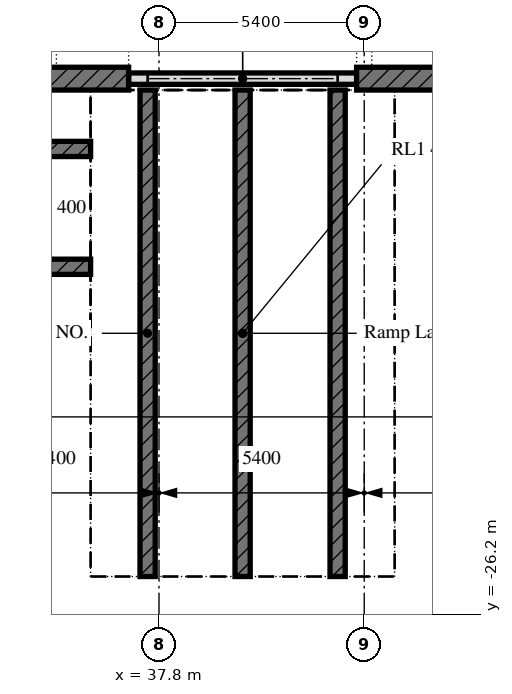
"""IFC4 building model, lengths in metres.
Left out: names, types, materials, properties, quantities, classifications, styles, units other than length and angle.
Written with IfcOpenShell. Run it as: python <this file> out.ifc"""

import sys

from ifc_helpers import new_model, si_unit, direction, frame, frame_2d, origin, place, context, subcontext, project, spatial, polyline, rectangle, outline, extrude, element, fill, save


model = new_model("IFC4")
c1 = context("Model", 3, precision=1e-05, world=origin(), true_north=direction((0.0, 1.0)))
c2 = subcontext(c1, "Body", "Model", "MODEL_VIEW")
j1 = project(units=[si_unit("LENGTHUNIT", "METRE"), si_unit("PLANEANGLEUNIT", "RADIAN")], contexts=[c1])
p1 = place(None, origin())
s1 = spatial("IfcSite", under=j1, at=p1, CompositionType="ELEMENT")
p2 = place(p1, origin())
s2 = spatial("IfcBuilding", under=s1, at=p2, CompositionType="ELEMENT")
p3 = place(p2, frame((0.0, 0.0, -4.5)))
s3 = spatial("IfcBuildingStorey", under=s2, at=p3, CompositionType="ELEMENT", Elevation=-4.5)
p4 = place(p3, frame((-11.8, -12.1, 0.0), z_axis=(0.0, 0.0, 1.0), x_axis=(1.0, 0.0, 0.0)))
e1 = element("IfcWall", 1, at=p4, inside=s3, PredefinedType="SOLIDWALL", context=c2, shape_type="SweptSolid", body=[
    extrude(rectangle(XDim=48.8, YDim=0.6, at=frame_2d((24.4, 0.0))), origin(), (0.0, 0.0, 1.0), 4.0),
])
p5 = place(p3, frame((43.0, -12.1, 0.0), z_axis=(0.0, 0.0, 1.0), x_axis=(1.0, 0.0, 0.0)))
e2 = element("IfcWall", 2, at=p5, inside=s3, PredefinedType="SOLIDWALL", context=c2, shape_type="SweptSolid", body=[
    extrude(rectangle(XDim=17.4, YDim=0.6, at=frame_2d((8.7, 0.0))), origin(), (0.0, 0.0, 1.0), 4.0),
])
p6 = place(p3, frame((37.0, -12.1, 0.0), z_axis=(0.0, 0.0, 1.0), x_axis=(1.0, 0.0, 0.0)))
e3 = element("IfcWall", 3, at=p6, inside=s3, PredefinedType="SOLIDWALL", context=c2, shape_type="SweptSolid", body=[
    extrude(rectangle(XDim=6.0, YDim=0.3, at=frame_2d((3.0, 0.0))), origin(), (0.0, 0.0, 1.0), 4.0),
])
p7 = place(p6, frame((0.5, 0.0, 0.0)))
e4 = element("IfcOpeningElement", 4, at=p7, cuts=e3, PredefinedType="OPENING", context=c2, shape_type="SweptSolid", body=[
    extrude(rectangle(XDim=5.0, YDim=3.0, at=frame_2d((2.5, 1.5))), frame((0.0, 0.16, 0.0), z_axis=(0.0, -1.0, 0.0), x_axis=(1.0, 0.0, 0.0)), (0.0, 0.0, 1.0), 0.32),
])
for number, where, z_axis, x_axis in (
    (5, (34.0, -17.05, -4.9), (0.0, 0.0, 1.0), (1.0, 0.0, 0.0)),
    (6, (34.0, -13.95, -4.9), (0.0, 0.0, 1.0), (1.0, 0.0, 0.0)),
):
    element("IfcWall", number, at=place(p3, frame(where, z_axis=z_axis, x_axis=x_axis)), inside=s3, PredefinedType="SOLIDWALL", context=c2, shape_type="SweptSolid", body=[
        extrude(outline(polyline([(0.0, 0.0), (2.0, 0.0), (2.0, 4.5), (0.0, 4.375), (0.0, 0.0)])), frame((0.0, 0.2, 0.0), z_axis=(0.0, -1.0, 0.0), x_axis=(1.0, 0.0, 0.0)), (0.0, 0.0, 1.0), 0.4),
    ])
for number, where, z_axis, x_axis in (
    (7, (37.5, -25.2, -4.9), (0.0, 0.0, 1.0), (0.0, 1.0, 0.0)),
    (8, (40.0, -25.2, -4.9), (0.0, 0.0, 1.0), (0.0, 1.0, 0.0)),
    (9, (42.5, -25.2, -4.9), (0.0, 0.0, 1.0), (0.0, 1.0, 0.0)),
):
    element("IfcWall", number, at=place(p3, frame(where, z_axis=z_axis, x_axis=x_axis)), inside=s3, PredefinedType="SOLIDWALL", context=c2, shape_type="SweptSolid", body=[
        extrude(rectangle(XDim=12.8, YDim=0.4, at=frame_2d((6.4, 0.0))), origin(), (0.0, 0.0, 1.0), 4.5),
    ])
p8 = place(p2, origin())
s4 = spatial("IfcBuildingStorey", under=s2, at=p8, CompositionType="ELEMENT", Elevation=0.0)
p9 = place(p8, frame((-2.0, -25.4, -9.4), z_axis=(0.0, 0.0, 1.0), x_axis=(1.0, 0.0, 0.0)))
e10 = element("IfcWall", 10, at=p9, inside=s4, PredefinedType="SOLIDWALL", context=c2, shape_type="SweptSolid", body=[
    extrude(rectangle(XDim=46.0, YDim=0.4, at=frame_2d((23.0, 0.0))), origin(), (0.0, 0.0, 1.0), 10.5),
])
p10 = place(p8, frame((-8.4, -18.8, -9.4), z_axis=(0.0, 0.0, 1.0), x_axis=(1.0, 0.0, 0.0)))
e11 = element("IfcWall", 11, at=p10, inside=s4, PredefinedType="SOLIDWALL", context=c2, shape_type="SweptSolid", body=[
    extrude(rectangle(XDim=44.4, YDim=0.4, at=frame_2d((22.2, 0.0))), origin(), (0.0, 0.0, 1.0), 10.5),
])
p11 = place(p8, frame((44.2, -25.6, -9.4), z_axis=(0.0, 0.0, 1.0), x_axis=(0.0, 1.0, 0.0)))
e12 = element("IfcWall", 12, at=p11, inside=s4, PredefinedType="SOLIDWALL", context=c2, shape_type="SweptSolid", body=[
    extrude(rectangle(XDim=13.2, YDim=0.4, at=frame_2d((6.6, 0.0))), origin(), (0.0, 0.0, 1.0), 10.5),
])
p12 = place(p7, origin())
e13 = element("IfcDoor", 13, at=p12, inside=s3, OperationType="ROLLINGUP", PredefinedType="DOOR", context=c2, shape_type="SweptSolid", body=[
    extrude(rectangle(XDim=5.0, YDim=3.0, at=frame_2d((2.5, 1.5))), frame((0.0, 0.025, 0.0), z_axis=(0.0, -1.0, 0.0), x_axis=(1.0, 0.0, 0.0)), (0.0, 0.0, 1.0), 0.05),
])
fill(e4, e13)
save(model, sys.argv[1])
